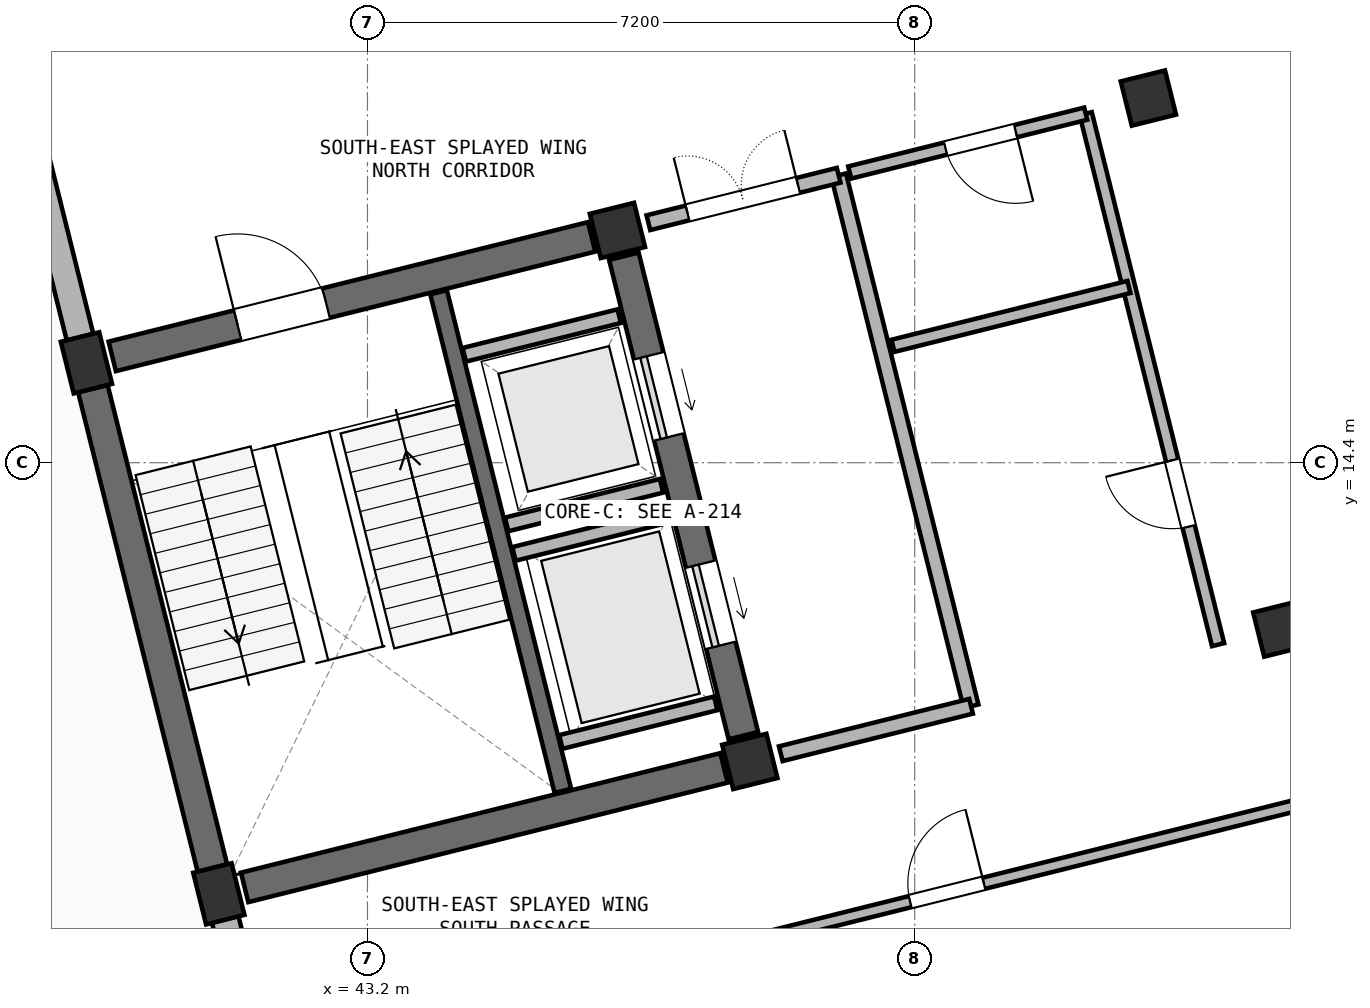
"""IFC4 building model, lengths in metres.
Left out: names, types, materials, properties, quantities, classifications, styles, units other than length and angle.
Written with IfcOpenShell. Run it as: python <this file> out.ifc"""

import sys

from ifc_helpers import new_model, si_unit, direction, frame, frame_2d, origin, origin_2d, place, context, subcontext, project, spatial, rectangle, extrude, element, fill, save


model = new_model("IFC4")
c1 = context("Model", 3, precision=1e-05, world=origin(), true_north=direction((0.0, 1.0)))
c2 = subcontext(c1, "Body", "Model", "MODEL_VIEW")
j1 = project(units=[si_unit("LENGTHUNIT", "METRE"), si_unit("PLANEANGLEUNIT", "RADIAN")], contexts=[c1])
p1 = place(None, origin())
s1 = spatial("IfcSite", under=j1, at=p1, CompositionType="ELEMENT")
p2 = place(p1, origin())
s2 = spatial("IfcBuilding", under=s1, at=p2, CompositionType="ELEMENT")
p3 = place(p2, frame((0.0, 0.0, 18.6)))
s3 = spatial("IfcBuildingStorey", under=s2, at=p3, CompositionType="ELEMENT", Elevation=18.6)
for number, where, z_axis, x_axis in (
    (1, (41.244, 8.728, 0.0), (0.0, 0.0, 1.0), (0.97, 0.242, 0.0)),
    (2, (39.502, 15.714, 0.0), (0.0, 0.0, 1.0), (0.97, 0.242, 0.0)),
):
    element("IfcColumn", number, at=place(p3, frame(where, z_axis=z_axis, x_axis=x_axis)), inside=s3, PredefinedType="COLUMN", context=c2, shape_type="SweptSolid", body=[
        extrude(rectangle(XDim=0.52, YDim=0.7, at=origin_2d()), origin(), (0.0, 0.0, 1.0), 3.9),
    ])
for number, where, z_axis, x_axis in (
    (3, (48.23, 10.47, 0.0), (0.0, 0.0, 1.0), (0.97, 0.242, 0.0)),
    (4, (46.489, 17.456, 0.0), (0.0, 0.0, 1.0), (0.97, 0.242, 0.0)),
    (5, (55.217, 12.212, 0.0), (0.0, 0.0, 1.0), (0.97, 0.242, 0.0)),
    (6, (53.475, 19.198, 0.0), (0.0, 0.0, 1.0), (0.97, 0.242, 0.0)),
):
    element("IfcColumn", number, at=place(p3, frame(where, z_axis=z_axis, x_axis=x_axis)), inside=s3, PredefinedType="COLUMN", context=c2, shape_type="SweptSolid", body=[
        extrude(rectangle(XDim=0.6, YDim=0.6, at=origin_2d()), origin(), (0.0, 0.0, 1.0), 3.9),
    ])
p4 = place(p3, frame((41.584, 8.813, 0.0), z_axis=(0.0, 0.0, 1.0), x_axis=(0.970294759049, 0.241925774902, 0.0)))
e7 = element("IfcWall", 7, at=p4, inside=s3, PredefinedType="SHEAR", context=c2, shape_type="SweptSolid", body=[
    extrude(rectangle(XDim=6.5, YDim=0.4, at=frame_2d((3.25, 0.0))), origin(), (0.0, 0.0, 1.0), 3.9),
])
p5 = place(p3, frame((48.146, 10.809, 0.0), z_axis=(0.0, 0.0, 1.0), x_axis=(-0.241925774902, 0.970294759049, 0.0)))
e8 = element("IfcWall", 8, at=p5, inside=s3, PredefinedType="SHEAR", context=c2, shape_type="SweptSolid", body=[
    extrude(rectangle(XDim=6.5, YDim=0.4, at=frame_2d((3.25, 0.0))), origin(), (0.0, 0.0, 1.0), 3.9),
])
p6 = place(p5, frame((1.225, 0.0, 0.0)))
e9 = element("IfcOpeningElement", 9, at=p6, cuts=e8, PredefinedType="OPENING", context=c2, shape_type="SweptSolid", body=[
    extrude(rectangle(XDim=1.1, YDim=2.2, at=frame_2d((0.55, 1.1))), frame((0.0, 0.21, 0.0), z_axis=(0.0, -1.0, 0.0), x_axis=(1.0, 0.0, 0.0)), (0.0, 0.0, 1.0), 0.42),
])
p7 = place(p5, frame((4.05, 0.0, 0.0)))
e10 = element("IfcOpeningElement", 10, at=p7, cuts=e8, PredefinedType="OPENING", context=c2, shape_type="SweptSolid", body=[
    extrude(rectangle(XDim=1.1, YDim=2.2, at=frame_2d((0.55, 1.1))), frame((0.0, 0.21, 0.0), z_axis=(0.0, -1.0, 0.0), x_axis=(1.0, 0.0, 0.0)), (0.0, 0.0, 1.0), 0.42),
])
p8 = place(p3, frame((46.149, 17.371, 0.0), z_axis=(0.0, 0.0, 1.0), x_axis=(-0.970294759049, -0.241925774902, 0.0)))
e11 = element("IfcWall", 11, at=p8, inside=s3, PredefinedType="SHEAR", context=c2, shape_type="SweptSolid", body=[
    extrude(rectangle(XDim=6.5, YDim=0.4, at=frame_2d((3.25, 0.0))), origin(), (0.0, 0.0, 1.0), 3.9),
])
p9 = place(p8, frame((3.6, 0.0, 0.0)))
e12 = element("IfcOpeningElement", 12, at=p9, cuts=e11, PredefinedType="OPENING", context=c2, shape_type="SweptSolid", body=[
    extrude(rectangle(XDim=1.2, YDim=2.2, at=frame_2d((0.6, 1.1))), frame((0.0, 0.21, 0.0), z_axis=(0.0, -1.0, 0.0), x_axis=(1.0, 0.0, 0.0)), (0.0, 0.0, 1.0), 0.42),
])
p10 = place(p3, frame((39.587, 15.375, 0.0), z_axis=(0.0, 0.0, 1.0), x_axis=(0.241925774902, -0.970294759049, 0.0)))
e13 = element("IfcWall", 13, at=p10, inside=s3, PredefinedType="SHEAR", context=c2, shape_type="SweptSolid", body=[
    extrude(rectangle(XDim=6.5, YDim=0.4, at=frame_2d((3.25, 0.0))), origin(), (0.0, 0.0, 1.0), 3.9),
])
p11 = place(p3, frame((45.771, 10.083, 0.0), z_axis=(0.0, 0.0, 1.0), x_axis=(-0.241898249226, 0.970301621673, 0.0)))
e14 = element("IfcWall", 14, at=p11, inside=s3, PredefinedType="SHEAR", context=c2, shape_type="SweptSolid", body=[
    extrude(rectangle(XDim=6.76, YDim=0.225, at=frame_2d((3.38, 0.0))), origin(), (0.0, 0.0, 1.0), 3.9),
])
for number, where, z_axis, x_axis in (
    (15, (45.745, 10.726, 0.0), (0.0, 0.0, 1.0), (0.97, 0.242, 0.0)),
    (16, (45.128, 13.2, 0.0), (0.0, 0.0, 1.0), (0.97, 0.242, 0.0)),
    (17, (45.031, 13.588, 0.0), (0.0, 0.0, 1.0), (0.97, 0.242, 0.0)),
    (18, (44.475, 15.82, 0.0), (0.0, 0.0, 1.0), (0.97, 0.242, 0.0)),
):
    element("IfcWall", number, at=place(p3, frame(where, z_axis=z_axis, x_axis=x_axis)), inside=s3, PredefinedType="PARTITIONING", context=c2, shape_type="SweptSolid", body=[
        extrude(rectangle(XDim=2.1, YDim=0.185, at=frame_2d((1.05, 0.0))), origin(), (0.0, 0.0, 1.0), 3.9),
    ])
p12 = place(p3, frame((41.328, 8.39, 0.0), z_axis=(0.0, 0.0, 1.0), x_axis=(0.241926152475, -0.970294664908, 0.0)))
e19 = element("IfcWall", 19, at=p12, inside=s3, PredefinedType="SOLIDWALL", context=c2, shape_type="SweptSolid", body=[
    extrude(rectangle(XDim=6.504, YDim=0.36, at=frame_2d((3.252, 0.0))), origin(), (0.0, 0.0, 1.0), 2.74),
])
p13 = place(p12, frame((2.352, 0.0, 0.0)))
e20 = element("IfcOpeningElement", 20, at=p13, cuts=e19, PredefinedType="OPENING", context=c2, shape_type="SweptSolid", body=[
    extrude(rectangle(XDim=1.8, YDim=2.35, at=frame_2d((0.9, 1.175))), frame((0.0, 0.19, 0.0), z_axis=(0.0, -1.0, 0.0), x_axis=(1.0, 0.0, 0.0)), (0.0, 0.0, 1.0), 0.38),
])
p14 = place(p3, frame((37.845, 22.363, 0.0), z_axis=(0.0, 0.0, 1.0), x_axis=(0.241926152475, -0.970294664908, 0.0)))
e21 = element("IfcWall", 21, at=p14, inside=s3, PredefinedType="SOLIDWALL", context=c2, shape_type="SweptSolid", body=[
    extrude(rectangle(XDim=6.504, YDim=0.36, at=frame_2d((3.252, 0.0))), origin(), (0.0, 0.0, 1.0), 2.74),
])
p15 = place(p3, frame((51.141, 11.196, 0.0), z_axis=(0.0, 0.0, 1.0), x_axis=(-0.241937193493, 0.970291911955, 0.0)))
e22 = element("IfcWall", 22, at=p15, inside=s3, PredefinedType="PARTITIONING", context=c2, shape_type="SweptSolid", body=[
    extrude(rectangle(XDim=7.2, YDim=0.2, at=frame_2d((3.6, 0.0))), origin(), (0.0, 0.0, 1.0), 2.78),
])
p16 = place(p3, frame((48.638, 10.572, 0.0), z_axis=(0.0, 0.0, 1.0), x_axis=(0.970309259708, 0.2418676095, 0.0)))
e23 = element("IfcWall", 23, at=p16, inside=s3, PredefinedType="PARTITIONING", context=c2, shape_type="SweptSolid", body=[
    extrude(rectangle(XDim=2.58, YDim=0.2, at=frame_2d((1.29, 0.0))), origin(), (0.0, 0.0, 1.0), 2.78),
])
p17 = place(p3, frame((49.399, 18.182, 0.0), z_axis=(0.0, 0.0, 1.0), x_axis=(-0.970309259708, -0.2418676095, 0.0)))
e24 = element("IfcWall", 24, at=p17, inside=s3, PredefinedType="PARTITIONING", context=c2, shape_type="SweptSolid", body=[
    extrude(rectangle(XDim=2.58, YDim=0.2, at=frame_2d((1.29, 0.0))), origin(), (0.0, 0.0, 1.0), 2.78),
])
p18 = place(p17, frame((0.55, 0.0, 0.0)))
e25 = element("IfcOpeningElement", 25, at=p18, cuts=e24, PredefinedType="OPENING", context=c2, shape_type="SweptSolid", body=[
    extrude(rectangle(XDim=1.5, YDim=2.2, at=frame_2d((0.75, 1.1))), frame((0.0, 0.11, 0.0), z_axis=(0.0, -1.0, 0.0), x_axis=(1.0, 0.0, 0.0)), (0.0, 0.0, 1.0), 0.22),
])
p19 = place(p3, frame((54.392, 12.006, 0.0), z_axis=(0.0, 0.0, 1.0), x_axis=(-0.241937193493, 0.970291911955, 0.0)))
e26 = element("IfcWall", 26, at=p19, inside=s3, PredefinedType="PARTITIONING", context=c2, shape_type="SweptSolid", body=[
    extrude(rectangle(XDim=7.2, YDim=0.165, at=frame_2d((3.6, 0.0))), origin(), (0.0, 0.0, 1.0), 2.78),
])
p20 = place(p19, frame((1.6, 0.0, 0.0)))
e27 = element("IfcOpeningElement", 27, at=p20, cuts=e26, PredefinedType="OPENING", context=c2, shape_type="SweptSolid", body=[
    extrude(rectangle(XDim=0.9, YDim=2.15, at=frame_2d((0.45, 1.075))), frame((0.0, 0.093, 0.0), z_axis=(0.0, -1.0, 0.0), x_axis=(1.0, 0.0, 0.0)), (0.0, 0.0, 1.0), 0.185),
])
p21 = place(p3, frame((52.65, 18.992, 0.0), z_axis=(0.0, 0.0, 1.0), x_axis=(-0.970294894235, -0.241925232711, 0.0)))
e28 = element("IfcWall", 28, at=p21, inside=s3, PredefinedType="PARTITIONING", context=c2, shape_type="SweptSolid", body=[
    extrude(rectangle(XDim=3.2, YDim=0.165, at=frame_2d((1.6, 0.0))), origin(), (0.0, 0.0, 1.0), 2.78),
])
p22 = place(p21, frame((0.95, 0.0, 0.0)))
e29 = element("IfcOpeningElement", 29, at=p22, cuts=e28, PredefinedType="OPENING", context=c2, shape_type="SweptSolid", body=[
    extrude(rectangle(XDim=0.95, YDim=2.15, at=frame_2d((0.475, 1.075))), frame((0.0, 0.093, 0.0), z_axis=(0.0, -1.0, 0.0), x_axis=(1.0, 0.0, 0.0)), (0.0, 0.0, 1.0), 0.185),
])
p23 = place(p3, frame((50.114, 15.938, 0.0), z_axis=(0.0, 0.0, 1.0), x_axis=(0.970294894235, 0.241925232711, 0.0)))
e30 = element("IfcWall", 30, at=p23, inside=s3, PredefinedType="PARTITIONING", context=c2, shape_type="SweptSolid", body=[
    extrude(rectangle(XDim=3.2, YDim=0.165, at=frame_2d((1.6, 0.0))), origin(), (0.0, 0.0, 1.0), 2.78),
])
p24 = place(p3, frame((42.528, 6.678, 0.0), z_axis=(0.0, 0.0, 1.0), x_axis=(0.97029515564, 0.241924184284, 0.0)))
e31 = element("IfcWall", 31, at=p24, inside=s3, PredefinedType="PARTITIONING", context=c2, shape_type="SweptSolid", body=[
    extrude(rectangle(XDim=17.1, YDim=0.15, at=frame_2d((8.55, 0.0))), origin(), (0.0, 0.0, 1.0), 2.78),
])
p25 = place(p24, frame((8.05, 0.0, 0.0)))
e32 = element("IfcOpeningElement", 32, at=p25, cuts=e31, PredefinedType="OPENING", context=c2, shape_type="SweptSolid", body=[
    extrude(rectangle(XDim=1.0, YDim=2.2, at=frame_2d((0.5, 1.1))), frame((0.0, 0.085, 0.0), z_axis=(0.0, -1.0, 0.0), x_axis=(1.0, 0.0, 0.0)), (0.0, 0.0, 1.0), 0.17),
])
p26 = place(p6, origin())
e33 = element("IfcDoor", 33, at=p26, inside=s3, OperationType="SLIDING_TO_LEFT", PredefinedType="DOOR", context=c2, shape_type="SweptSolid", body=[
    extrude(rectangle(XDim=1.1, YDim=2.2, at=frame_2d((0.55, 1.1))), frame((0.0, 0.025, 0.0), z_axis=(0.0, -1.0, 0.0), x_axis=(1.0, 0.0, 0.0)), (0.0, 0.0, 1.0), 0.05),
])
fill(e9, e33)
p27 = place(p7, origin())
e34 = element("IfcDoor", 34, at=p27, inside=s3, OperationType="SLIDING_TO_LEFT", PredefinedType="DOOR", context=c2, shape_type="SweptSolid", body=[
    extrude(rectangle(XDim=1.1, YDim=2.2, at=frame_2d((0.55, 1.1))), frame((0.0, 0.025, 0.0), z_axis=(0.0, -1.0, 0.0), x_axis=(1.0, 0.0, 0.0)), (0.0, 0.0, 1.0), 0.05),
])
fill(e10, e34)
p28 = place(p9, frame((1.2, 0.0, 0.0), z_axis=(0.0, 0.0, 1.0), x_axis=(-1.0, 0.0, 0.0)))
e35 = element("IfcDoor", 35, at=p28, inside=s3, OperationType="SINGLE_SWING_LEFT", PredefinedType="DOOR", context=c2, shape_type="SweptSolid", body=[
    extrude(rectangle(XDim=1.2, YDim=2.2, at=frame_2d((0.6, 1.1))), frame((0.0, 0.025, 0.0), z_axis=(0.0, -1.0, 0.0), x_axis=(1.0, 0.0, 0.0)), (0.0, 0.0, 1.0), 0.05),
])
fill(e12, e35)
p29 = place(p18, frame((1.5, 0.0, 0.0), z_axis=(0.0, 0.0, 1.0), x_axis=(-1.0, 0.0, 0.0)))
e36 = element("IfcDoor", 36, at=p29, inside=s3, OperationType="DOUBLE_DOOR_SINGLE_SWING", PredefinedType="DOOR", context=c2, shape_type="SweptSolid", body=[
    extrude(rectangle(XDim=1.5, YDim=2.2, at=frame_2d((0.75, 1.1))), frame((0.0, 0.025, 0.0), z_axis=(0.0, -1.0, 0.0), x_axis=(1.0, 0.0, 0.0)), (0.0, 0.0, 1.0), 0.05),
])
fill(e25, e36)
p30 = place(p20, origin())
e37 = element("IfcDoor", 37, at=p30, inside=s3, OperationType="SINGLE_SWING_RIGHT", PredefinedType="DOOR", context=c2, shape_type="SweptSolid", body=[
    extrude(rectangle(XDim=0.9, YDim=2.15, at=frame_2d((0.45, 1.075))), frame((0.0, 0.025, 0.0), z_axis=(0.0, -1.0, 0.0), x_axis=(1.0, 0.0, 0.0)), (0.0, 0.0, 1.0), 0.05),
])
fill(e27, e37)
p31 = place(p22, origin())
e38 = element("IfcDoor", 38, at=p31, inside=s3, OperationType="SINGLE_SWING_LEFT", PredefinedType="DOOR", context=c2, shape_type="SweptSolid", body=[
    extrude(rectangle(XDim=0.95, YDim=2.15, at=frame_2d((0.475, 1.075))), frame((0.0, 0.025, 0.0), z_axis=(0.0, -1.0, 0.0), x_axis=(1.0, 0.0, 0.0)), (0.0, 0.0, 1.0), 0.05),
])
fill(e29, e38)
p32 = place(p25, origin())
e39 = element("IfcDoor", 39, at=p32, inside=s3, OperationType="SINGLE_SWING_RIGHT", PredefinedType="DOOR", context=c2, shape_type="SweptSolid", body=[
    extrude(rectangle(XDim=1.0, YDim=2.2, at=frame_2d((0.5, 1.1))), frame((0.0, 0.025, 0.0), z_axis=(0.0, -1.0, 0.0), x_axis=(1.0, 0.0, 0.0)), (0.0, 0.0, 1.0), 0.05),
])
fill(e32, e39)
save(model, sys.argv[1])
